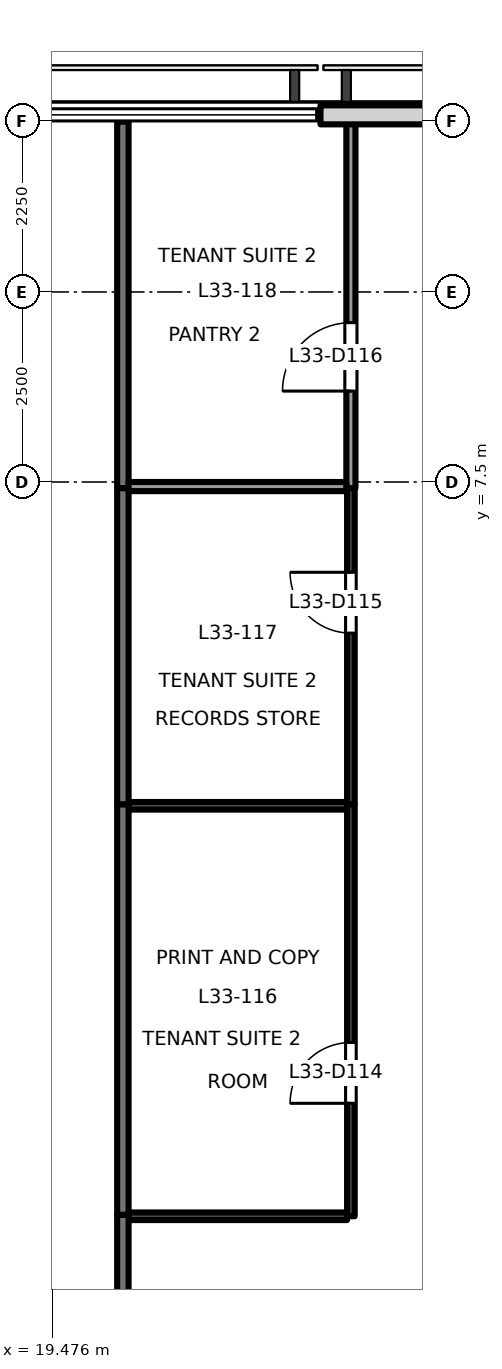
"""IFC4 building model, lengths in metres.
Left out: names, types, materials, properties, quantities, classifications, styles, units other than length and angle.
Written with IfcOpenShell. Run it as: python <this file> out.ifc"""

import sys

from ifc_helpers import new_model, si_unit, direction, frame, frame_2d, origin, place, context, subcontext, project, spatial, rectangle, extrude, element, fill, save


model = new_model("IFC4")
c1 = context("Model", 3, precision=1e-05, world=origin(), true_north=direction((0.0, 1.0)))
c2 = subcontext(c1, "Body", "Model", "MODEL_VIEW")
j1 = project(units=[si_unit("LENGTHUNIT", "METRE"), si_unit("PLANEANGLEUNIT", "RADIAN")], contexts=[c1])
p1 = place(None, origin())
s1 = spatial("IfcSite", under=j1, at=p1, CompositionType="ELEMENT")
p2 = place(p1, origin())
s2 = spatial("IfcBuilding", under=s1, at=p2, CompositionType="ELEMENT")
p3 = place(p2, frame((0.0, 0.0, 146.1)))
s3 = spatial("IfcBuildingStorey", under=s2, at=p3, CompositionType="ELEMENT", Elevation=146.1)
p4 = place(p3, frame((25.955, 12.33, 0.0), z_axis=(0.0, 0.0, 1.0), x_axis=(-1.0, 0.0, 0.0)))
e1 = element("IfcWall", 1, at=p4, inside=s3, PredefinedType="SOLIDWALL", context=c2, shape_type="SweptSolid", body=[
    extrude(rectangle(XDim=2.955, YDim=0.25, at=frame_2d((1.478, 0.0))), origin(), (0.0, 0.0, 1.0), 3.8),
])
p5 = place(p3, frame((20.4, -2.14, 0.0), z_axis=(0.0, 0.0, 1.0), x_axis=(0.0, -1.0, 0.0)))
e2 = element("IfcWall", 2, at=p5, inside=s3, PredefinedType="PARTITIONING", context=c2, shape_type="SweptSolid", body=[
    extrude(rectangle(XDim=6.04, YDim=0.15, at=frame_2d((3.02, 0.0))), origin(), (0.0, 0.0, 1.0), 3.3),
])
p6 = place(p5, frame((3.055, 0.0, 0.0)))
e3 = element("IfcOpeningElement", 3, at=p6, cuts=e2, PredefinedType="OPENING", context=c2, shape_type="SweptSolid", body=[
    extrude(rectangle(XDim=1.8, YDim=2.1, at=frame_2d((0.9, 1.05))), frame((0.0, 0.085, 0.0), z_axis=(0.0, -1.0, 0.0), x_axis=(1.0, 0.0, 0.0)), (0.0, 0.0, 1.0), 0.171),
])
p7 = place(p3, frame((20.4, 3.26, 0.0), z_axis=(0.0, 0.0, 1.0), x_axis=(0.0, -1.0, 0.0)))
e4 = element("IfcWall", 4, at=p7, inside=s3, PredefinedType="PARTITIONING", context=c2, shape_type="SweptSolid", body=[
    extrude(rectangle(XDim=5.4, YDim=0.15, at=frame_2d((2.7, 0.0))), origin(), (0.0, 0.0, 1.0), 3.3),
])
p8 = place(p3, frame((20.4, 7.42, 0.0), z_axis=(0.0, 0.0, 1.0), x_axis=(0.0, -1.0, 0.0)))
e5 = element("IfcWall", 5, at=p8, inside=s3, PredefinedType="PARTITIONING", context=c2, shape_type="SweptSolid", body=[
    extrude(rectangle(XDim=4.16, YDim=0.15, at=frame_2d((2.08, 0.0))), origin(), (0.0, 0.0, 1.0), 3.3),
])
p9 = place(p3, frame((20.4, 12.24, 0.0), z_axis=(0.0, 0.0, 1.0), x_axis=(0.0, -1.0, 0.0)))
e6 = element("IfcWall", 6, at=p9, inside=s3, PredefinedType="PARTITIONING", context=c2, shape_type="SweptSolid", body=[
    extrude(rectangle(XDim=4.82, YDim=0.15, at=frame_2d((2.41, 0.0))), origin(), (0.0, 0.0, 1.0), 3.8),
])
p10 = place(p3, frame((20.475, -2.16, 0.0), z_axis=(0.0, 0.0, 1.0), x_axis=(1.0, 0.0, 0.0)))
e7 = element("IfcWall", 7, at=p10, inside=s3, PredefinedType="PARTITIONING", context=c2, shape_type="SweptSolid", body=[
    extrude(rectangle(XDim=2.875, YDim=0.1, at=frame_2d((1.438, 0.0))), origin(), (0.0, 0.0, 1.0), 3.8),
])
p11 = place(p3, frame((23.4, -2.16, 0.0), z_axis=(0.0, 0.0, 1.0), x_axis=(0.0, 1.0, 0.0)))
e8 = element("IfcWall", 8, at=p11, inside=s3, PredefinedType="PARTITIONING", context=c2, shape_type="SweptSolid", body=[
    extrude(rectangle(XDim=5.42, YDim=0.1, at=frame_2d((2.71, 0.0))), origin(), (0.0, 0.0, 1.0), 3.3),
])
p12 = place(p11, frame((1.486, 0.0, 0.0)))
e9 = element("IfcOpeningElement", 9, at=p12, cuts=e8, PredefinedType="OPENING", context=c2, shape_type="SweptSolid", body=[
    extrude(rectangle(XDim=0.8, YDim=2.1, at=frame_2d((0.4, 1.05))), frame((0.0, 0.061, 0.0), z_axis=(0.0, -1.0, 0.0), x_axis=(1.0, 0.0, 0.0)), (0.0, 0.0, 1.0), 0.121),
])
p13 = place(p3, frame((23.4, 3.26, 0.0), z_axis=(0.0, 0.0, 1.0), x_axis=(0.0, 1.0, 0.0)))
e10 = element("IfcWall", 10, at=p13, inside=s3, PredefinedType="PARTITIONING", context=c2, shape_type="SweptSolid", body=[
    extrude(rectangle(XDim=4.16, YDim=0.1, at=frame_2d((2.08, 0.0))), origin(), (0.0, 0.0, 1.0), 3.3),
])
p14 = place(p13, frame((2.252, 0.0, 0.0)))
e11 = element("IfcOpeningElement", 11, at=p14, cuts=e10, PredefinedType="OPENING", context=c2, shape_type="SweptSolid", body=[
    extrude(rectangle(XDim=0.8, YDim=2.1, at=frame_2d((0.4, 1.05))), frame((0.0, 0.061, 0.0), z_axis=(0.0, -1.0, 0.0), x_axis=(1.0, 0.0, 0.0)), (0.0, 0.0, 1.0), 0.121),
])
p15 = place(p3, frame((23.4, 7.42, 0.0), z_axis=(0.0, 0.0, 1.0), x_axis=(0.0, 1.0, 0.0)))
e12 = element("IfcWall", 12, at=p15, inside=s3, PredefinedType="PARTITIONING", context=c2, shape_type="SweptSolid", body=[
    extrude(rectangle(XDim=4.82, YDim=0.12, at=frame_2d((2.41, 0.0))), origin(), (0.0, 0.0, 1.0), 3.8),
])
p16 = place(p15, frame((1.276, 0.0, 0.0)))
e13 = element("IfcOpeningElement", 13, at=p16, cuts=e12, PredefinedType="OPENING", context=c2, shape_type="SweptSolid", body=[
    extrude(rectangle(XDim=0.9, YDim=2.1, at=frame_2d((0.45, 1.05))), frame((0.0, 0.071, 0.0), z_axis=(0.0, -1.0, 0.0), x_axis=(1.0, 0.0, 0.0)), (0.0, 0.0, 1.0), 0.141),
])
p17 = place(p3, frame((20.475, 3.24, 0.0), z_axis=(0.0, 0.0, 1.0), x_axis=(1.0, 0.0, 0.0)))
e14 = element("IfcWall", 14, at=p17, inside=s3, PredefinedType="PARTITIONING", context=c2, shape_type="SweptSolid", body=[
    extrude(rectangle(XDim=2.875, YDim=0.1, at=frame_2d((1.438, 0.0))), origin(), (0.0, 0.0, 1.0), 3.8),
])
p18 = place(p3, frame((20.475, 7.44, 0.0), z_axis=(0.0, 0.0, 1.0), x_axis=(1.0, 0.0, 0.0)))
e15 = element("IfcWall", 15, at=p18, inside=s3, PredefinedType="PARTITIONING", context=c2, shape_type="SweptSolid", body=[
    extrude(rectangle(XDim=2.865, YDim=0.12, at=frame_2d((1.433, 0.0))), origin(), (0.0, 0.0, 1.0), 3.8),
])
p19 = place(p12, origin())
e16 = element("IfcDoor", 16, at=p19, inside=s3, OperationType="SINGLE_SWING_LEFT", PredefinedType="DOOR", context=c2, shape_type="SweptSolid", body=[
    extrude(rectangle(XDim=0.8, YDim=2.1, at=frame_2d((0.4, 1.05))), frame((0.0, 0.025, 0.0), z_axis=(0.0, -1.0, 0.0), x_axis=(1.0, 0.0, 0.0)), (0.0, 0.0, 1.0), 0.05),
])
fill(e9, e16)
p20 = place(p14, origin())
e17 = element("IfcDoor", 17, at=p20, inside=s3, OperationType="SINGLE_SWING_RIGHT", PredefinedType="DOOR", context=c2, shape_type="SweptSolid", body=[
    extrude(rectangle(XDim=0.8, YDim=2.1, at=frame_2d((0.4, 1.05))), frame((0.0, 0.025, 0.0), z_axis=(0.0, -1.0, 0.0), x_axis=(1.0, 0.0, 0.0)), (0.0, 0.0, 1.0), 0.05),
])
fill(e11, e17)
p21 = place(p16, origin())
e18 = element("IfcDoor", 18, at=p21, inside=s3, OperationType="SINGLE_SWING_LEFT", PredefinedType="DOOR", context=c2, shape_type="SweptSolid", body=[
    extrude(rectangle(XDim=0.9, YDim=2.1, at=frame_2d((0.45, 1.05))), frame((0.0, 0.025, 0.0), z_axis=(0.0, -1.0, 0.0), x_axis=(1.0, 0.0, 0.0)), (0.0, 0.0, 1.0), 0.05),
])
fill(e13, e18)
save(model, sys.argv[1])
